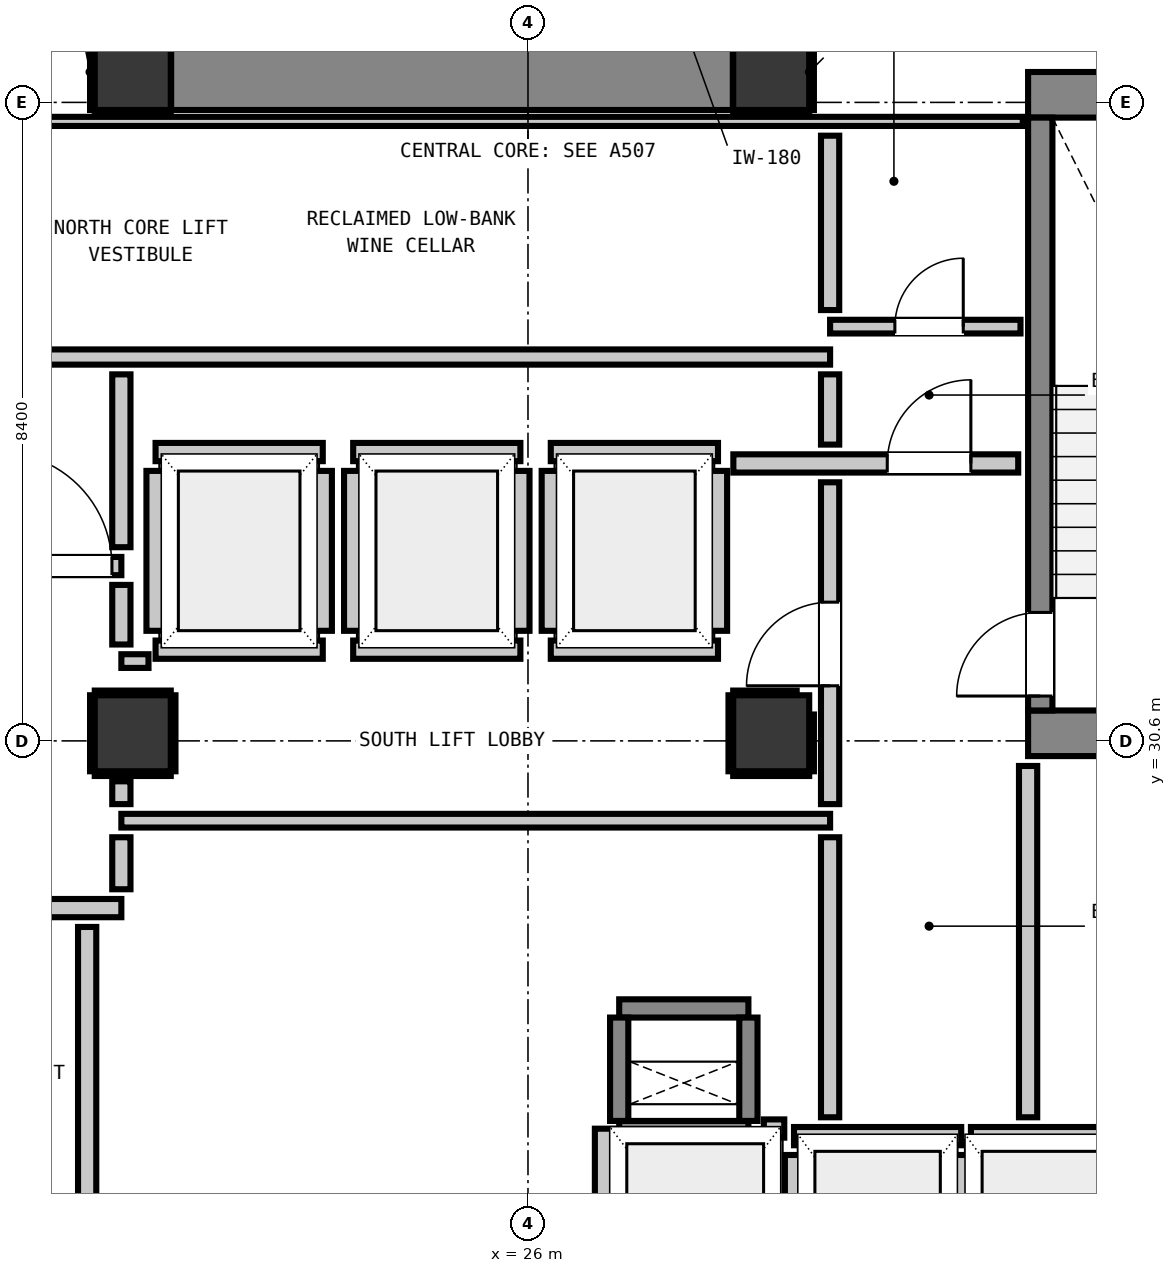
"""IFC4 building model, lengths in metres.
Left out: names, types, materials, properties, quantities, classifications, styles, units other than length and angle.
Written with IfcOpenShell. Run it as: python <this file> out.ifc"""

import sys

from ifc_helpers import new_model, si_unit, direction, frame, frame_2d, origin, origin_2d, place, context, subcontext, project, spatial, rectangle, extrude, element, fill, save


model = new_model("IFC4")
c1 = context("Model", 3, precision=1e-05, world=origin(), true_north=direction((0.0, 1.0)))
c2 = subcontext(c1, "Body", "Model", "MODEL_VIEW")
j1 = project(units=[si_unit("LENGTHUNIT", "METRE"), si_unit("PLANEANGLEUNIT", "RADIAN")], contexts=[c1])
p1 = place(None, origin())
s1 = spatial("IfcSite", under=j1, at=p1, CompositionType="ELEMENT")
p2 = place(p1, origin())
s2 = spatial("IfcBuilding", under=s1, at=p2, CompositionType="ELEMENT")
p3 = place(p2, frame((0.0, 0.0, 135.96)))
s3 = spatial("IfcBuildingStorey", under=s2, at=p3, CompositionType="ELEMENT", Elevation=135.96)
for number, where, z_axis, x_axis in (
    (1, (20.8, 39.4, 0.0), (0.0, 0.0, 1.0), (1.0, 0.0, 0.0)),
    (2, (29.2, 39.4, 0.0), (0.0, 0.0, 1.0), (1.0, 0.0, 0.0)),
):
    element("IfcColumn", number, at=place(p3, frame(where, z_axis=z_axis, x_axis=x_axis)), inside=s3, PredefinedType="COLUMN", context=c2, shape_type="SweptSolid", body=[
        extrude(rectangle(XDim=1.0, YDim=1.0, at=origin_2d()), origin(), (0.0, 0.0, 1.0), 3.32),
    ])
p4 = place(p3, frame((32.58, 39.1, 0.0), z_axis=(0.0, 0.0, 1.0), x_axis=(1.0, 0.0, 0.0)))
e3 = element("IfcWall", 3, at=p4, inside=s3, PredefinedType="SHEAR", context=c2, shape_type="SweptSolid", body=[
    extrude(rectangle(XDim=4.08, YDim=0.6, at=frame_2d((2.04, 0.0))), origin(), (0.0, 0.0, 1.0), 3.32),
])
p5 = place(p3, frame((32.58, 30.7, 0.0), z_axis=(0.0, 0.0, 1.0), x_axis=(1.0, 0.0, 0.0)))
e4 = element("IfcWall", 4, at=p5, inside=s3, PredefinedType="SHEAR", context=c2, shape_type="SweptSolid", body=[
    extrude(rectangle(XDim=3.415, YDim=0.6, at=frame_2d((1.708, 0.0))), origin(), (0.0, 0.0, 1.0), 3.32),
])
p6 = place(p3, frame((21.305, 39.4, 0.0), z_axis=(0.0, 0.0, 1.0), x_axis=(1.0, 0.0, 0.0)))
e5 = element("IfcWall", 5, at=p6, inside=s3, PredefinedType="SHEAR", context=c2, shape_type="SweptSolid", body=[
    extrude(rectangle(XDim=7.39, YDim=1.0, at=frame_2d((3.695, 0.0))), origin(), (0.0, 0.0, 1.0), 3.32),
])
p7 = place(p3, frame((32.74, 31.0, 0.0), z_axis=(0.0, 0.0, 1.0), x_axis=(0.0, 1.0, 0.0)))
e6 = element("IfcWall", 6, at=p7, inside=s3, PredefinedType="SHEAR", context=c2, shape_type="SweptSolid", body=[
    extrude(rectangle(XDim=7.8, YDim=0.32, at=frame_2d((3.9, 0.0))), origin(), (0.0, 0.0, 1.0), 3.32),
])
p8 = place(p7, frame((0.19, 0.0, 0.0)))
e7 = element("IfcOpeningElement", 7, at=p8, cuts=e6, PredefinedType="OPENING", context=c2, shape_type="SweptSolid", body=[
    extrude(rectangle(XDim=1.1, YDim=2.15, at=frame_2d((0.55, 1.075))), frame((0.0, 0.17, 0.0), z_axis=(0.0, -1.0, 0.0), x_axis=(1.0, 0.0, 0.0)), (0.0, 0.0, 1.0), 0.34),
])
for number, where, z_axis, x_axis in (
    (8, (27.2, 25.48, 0.0), (0.0, 0.0, 1.0), (1.0, 0.0, 0.0)),
    (9, (27.2, 27.08, 0.0), (0.0, 0.0, 1.0), (1.0, 0.0, 0.0)),
):
    element("IfcWall", number, at=place(p3, frame(where, z_axis=z_axis, x_axis=x_axis)), inside=s3, PredefinedType="SHEAR", context=c2, shape_type="SweptSolid", body=[
        extrude(rectangle(XDim=1.7, YDim=0.24, at=frame_2d((0.85, 0.0))), origin(), (0.0, 0.0, 1.0), 3.32),
    ])
for number, where, z_axis, x_axis in (
    (10, (27.2, 25.6, 0.0), (0.0, 0.0, 1.0), (0.0, 1.0, 0.0)),
    (11, (28.9, 25.6, 0.0), (0.0, 0.0, 1.0), (0.0, 1.0, 0.0)),
):
    element("IfcWall", number, at=place(p3, frame(where, z_axis=z_axis, x_axis=x_axis)), inside=s3, PredefinedType="SHEAR", context=c2, shape_type="SweptSolid", body=[
        extrude(rectangle(XDim=1.36, YDim=0.24, at=frame_2d((0.68, 0.0))), origin(), (0.0, 0.0, 1.0), 3.32),
    ])
for number, where, z_axis, x_axis in (
    (12, (20.8, 30.7, 0.0), (0.0, 0.0, 1.0), (1.0, 0.0, 0.0)),
    (13, (29.2, 30.7, 0.0), (0.0, 0.0, 1.0), (1.0, 0.0, 0.0)),
):
    element("IfcColumn", number, at=place(p3, frame(where, z_axis=z_axis, x_axis=x_axis)), inside=s3, PredefinedType="COLUMN", context=c2, shape_type="SweptSolid", body=[
        extrude(rectangle(XDim=1.0, YDim=1.0, at=origin_2d()), origin(), (0.0, 0.0, 1.0), 3.32),
    ])
for number, where, z_axis, x_axis in (
    (14, (21.1, 31.8, 0.0), (0.0, 0.0, 1.0), (1.0, 0.0, 0.0)),
    (15, (21.1, 34.4, 0.0), (0.0, 0.0, 1.0), (1.0, 0.0, 0.0)),
):
    element("IfcWall", number, at=place(p3, frame(where, z_axis=z_axis, x_axis=x_axis)), inside=s3, PredefinedType="PARTITIONING", context=c2, shape_type="SweptSolid", body=[
        extrude(rectangle(XDim=2.2, YDim=0.24, at=frame_2d((1.1, 0.0))), origin(), (0.0, 0.0, 1.0), 3.08),
    ])
p9 = place(p3, frame((21.1, 32.048, 0.0), z_axis=(0.0, 0.0, 1.0), x_axis=(0.0, 1.0, 0.0)))
e16 = element("IfcWall", 16, at=p9, inside=s3, PredefinedType="PARTITIONING", context=c2, shape_type="SweptSolid", body=[
    extrude(rectangle(XDim=2.104, YDim=0.24, at=frame_2d((1.052, 0.0))), origin(), (0.0, 0.0, 1.0), 2.315),
])
p10 = place(p3, frame((23.3, 32.048, 0.0), z_axis=(0.0, 0.0, 1.0), x_axis=(0.0, 1.0, 0.0)))
e17 = element("IfcWall", 17, at=p10, inside=s3, PredefinedType="PARTITIONING", context=c2, shape_type="SweptSolid", body=[
    extrude(rectangle(XDim=2.104, YDim=0.24, at=frame_2d((1.052, 0.0))), origin(), (0.0, 0.0, 1.0), 3.08),
])
for number, where, z_axis, x_axis in (
    (18, (23.7, 31.8, 0.0), (0.0, 0.0, 1.0), (1.0, 0.0, 0.0)),
    (19, (23.7, 34.4, 0.0), (0.0, 0.0, 1.0), (1.0, 0.0, 0.0)),
):
    element("IfcWall", number, at=place(p3, frame(where, z_axis=z_axis, x_axis=x_axis)), inside=s3, PredefinedType="PARTITIONING", context=c2, shape_type="SweptSolid", body=[
        extrude(rectangle(XDim=2.2, YDim=0.24, at=frame_2d((1.1, 0.0))), origin(), (0.0, 0.0, 1.0), 3.08),
    ])
for number, where, z_axis, x_axis in (
    (20, (23.7, 32.048, 0.0), (0.0, 0.0, 1.0), (0.0, 1.0, 0.0)),
    (21, (25.9, 32.048, 0.0), (0.0, 0.0, 1.0), (0.0, 1.0, 0.0)),
):
    element("IfcWall", number, at=place(p3, frame(where, z_axis=z_axis, x_axis=x_axis)), inside=s3, PredefinedType="PARTITIONING", context=c2, shape_type="SweptSolid", body=[
        extrude(rectangle(XDim=2.104, YDim=0.24, at=frame_2d((1.052, 0.0))), origin(), (0.0, 0.0, 1.0), 3.08),
    ])
for number, where, z_axis, x_axis in (
    (22, (26.3, 31.8, 0.0), (0.0, 0.0, 1.0), (1.0, 0.0, 0.0)),
    (23, (26.3, 34.4, 0.0), (0.0, 0.0, 1.0), (1.0, 0.0, 0.0)),
):
    element("IfcWall", number, at=place(p3, frame(where, z_axis=z_axis, x_axis=x_axis)), inside=s3, PredefinedType="PARTITIONING", context=c2, shape_type="SweptSolid", body=[
        extrude(rectangle(XDim=2.2, YDim=0.24, at=frame_2d((1.1, 0.0))), origin(), (0.0, 0.0, 1.0), 3.08),
    ])
for number, where, z_axis, x_axis in (
    (24, (26.3, 32.048, 0.0), (0.0, 0.0, 1.0), (0.0, 1.0, 0.0)),
    (25, (28.5, 32.048, 0.0), (0.0, 0.0, 1.0), (0.0, 1.0, 0.0)),
):
    element("IfcWall", number, at=place(p3, frame(where, z_axis=z_axis, x_axis=x_axis)), inside=s3, PredefinedType="PARTITIONING", context=c2, shape_type="SweptSolid", body=[
        extrude(rectangle(XDim=2.104, YDim=0.24, at=frame_2d((1.052, 0.0))), origin(), (0.0, 0.0, 1.0), 3.08),
    ])
p11 = place(p3, frame((29.5, 25.4, 0.0), z_axis=(0.0, 0.0, 1.0), x_axis=(1.0, 0.0, 0.0)))
e26 = element("IfcWall", 26, at=p11, inside=s3, PredefinedType="PARTITIONING", context=c2, shape_type="SweptSolid", body=[
    extrude(rectangle(XDim=2.2, YDim=0.24, at=frame_2d((1.1, 0.0))), origin(), (0.0, 0.0, 1.0), 3.08),
])
p12 = place(p3, frame((29.5, 22.632, 0.0), z_axis=(0.0, 0.0, 1.0), x_axis=(0.0, 1.0, 0.0)))
e27 = element("IfcWall", 27, at=p12, inside=s3, PredefinedType="PARTITIONING", context=c2, shape_type="SweptSolid", body=[
    extrude(rectangle(XDim=2.52, YDim=0.24, at=frame_2d((1.26, 0.0))), origin(), (0.0, 0.0, 1.0), 2.315),
])
p13 = place(p3, frame((31.7, 22.63, 0.0), z_axis=(0.0, 0.0, 1.0), x_axis=(0.0, 1.0, 0.0)))
e28 = element("IfcWall", 28, at=p13, inside=s3, PredefinedType="PARTITIONING", context=c2, shape_type="SweptSolid", body=[
    extrude(rectangle(XDim=2.522, YDim=0.24, at=frame_2d((1.261, 0.0))), origin(), (0.0, 0.0, 1.0), 3.08),
])
p14 = place(p3, frame((31.828, 25.4, 0.0), z_axis=(0.0, 0.0, 1.0), x_axis=(1.0, 0.0, 0.0)))
e29 = element("IfcWall", 29, at=p14, inside=s3, PredefinedType="PARTITIONING", context=c2, shape_type="SweptSolid", body=[
    extrude(rectangle(XDim=2.072, YDim=0.24, at=frame_2d((1.036, 0.0))), origin(), (0.0, 0.0, 1.0), 3.08),
])
p15 = place(p3, frame((29.103, 25.5, 0.0), z_axis=(0.0, 0.0, 1.0), x_axis=(1.0, 0.0, 0.0)))
e30 = element("IfcWall", 30, at=p15, inside=s3, PredefinedType="PARTITIONING", context=c2, shape_type="SweptSolid", body=[
    extrude(rectangle(XDim=0.269, YDim=0.24, at=frame_2d((0.135, 0.0))), origin(), (0.0, 0.0, 1.0), 3.08),
])
p16 = place(p3, frame((27.0, 22.63, 0.0), z_axis=(0.0, 0.0, 1.0), x_axis=(0.0, 1.0, 0.0)))
e31 = element("IfcWall", 31, at=p16, inside=s3, PredefinedType="PARTITIONING", context=c2, shape_type="SweptSolid", body=[
    extrude(rectangle(XDim=2.868, YDim=0.24, at=frame_2d((1.434, 0.0))), origin(), (0.0, 0.0, 1.0), 3.08),
])
p17 = place(p3, frame((17.45, 28.4, 0.0), z_axis=(0.0, 0.0, 1.0), x_axis=(1.0, 0.0, 0.0)))
e32 = element("IfcWall", 32, at=p17, inside=s3, PredefinedType="PARTITIONING", context=c2, shape_type="SweptSolid", body=[
    extrude(rectangle(XDim=3.2, YDim=0.24, at=frame_2d((1.6, 0.0))), origin(), (0.0, 0.0, 1.0), 3.08),
])
p18 = place(p17, frame((0.784, 0.0, 0.0)))
e33 = element("IfcOpeningElement", 33, at=p18, cuts=e32, PredefinedType="OPENING", context=c2, shape_type="SweptSolid", body=[
    extrude(rectangle(XDim=1.1, YDim=2.15, at=frame_2d((0.55, 1.075))), frame((0.0, 0.13, 0.0), z_axis=(0.0, -1.0, 0.0), x_axis=(1.0, 0.0, 0.0)), (0.0, 0.0, 1.0), 0.26),
])
p19 = place(p3, frame((17.45, 32.9, 0.0), z_axis=(0.0, 0.0, 1.0), x_axis=(1.0, 0.0, 0.0)))
e34 = element("IfcWall", 34, at=p19, inside=s3, PredefinedType="PARTITIONING", context=c2, shape_type="SweptSolid", body=[
    extrude(rectangle(XDim=3.2, YDim=0.24, at=frame_2d((1.6, 0.0))), origin(), (0.0, 0.0, 1.0), 3.08),
])
p20 = place(p19, frame((0.159, 0.0, 0.0)))
e35 = element("IfcOpeningElement", 35, at=p20, cuts=e34, PredefinedType="OPENING", context=c2, shape_type="SweptSolid", body=[
    extrude(rectangle(XDim=1.1, YDim=2.15, at=frame_2d((0.55, 1.075))), frame((0.0, 0.13, 0.0), z_axis=(0.0, -1.0, 0.0), x_axis=(1.0, 0.0, 0.0)), (0.0, 0.0, 1.0), 0.26),
])
p21 = place(p19, frame((1.576, 0.0, 0.0)))
e36 = element("IfcOpeningElement", 36, at=p21, cuts=e34, PredefinedType="OPENING", context=c2, shape_type="SweptSolid", body=[
    extrude(rectangle(XDim=1.5, YDim=2.15, at=frame_2d((0.75, 1.075))), frame((0.0, 0.13, 0.0), z_axis=(0.0, -1.0, 0.0), x_axis=(1.0, 0.0, 0.0)), (0.0, 0.0, 1.0), 0.26),
])
p22 = place(p3, frame((28.702, 34.25, 0.0), z_axis=(0.0, 0.0, 1.0), x_axis=(1.0, 0.0, 0.0)))
e37 = element("IfcWall", 37, at=p22, inside=s3, PredefinedType="PARTITIONING", context=c2, shape_type="SweptSolid", body=[
    extrude(rectangle(XDim=3.748, YDim=0.24, at=frame_2d((1.874, 0.0))), origin(), (0.0, 0.0, 1.0), 3.08),
])
p23 = place(p22, frame((2.025, 0.0, 0.0)))
e38 = element("IfcOpeningElement", 38, at=p23, cuts=e37, PredefinedType="OPENING", context=c2, shape_type="SweptSolid", body=[
    extrude(rectangle(XDim=1.1, YDim=2.15, at=frame_2d((0.55, 1.075))), frame((0.0, 0.13, 0.0), z_axis=(0.0, -1.0, 0.0), x_axis=(1.0, 0.0, 0.0)), (0.0, 0.0, 1.0), 0.26),
])
p24 = place(p3, frame((18.95, 35.65, 0.0), z_axis=(0.0, 0.0, 1.0), x_axis=(1.0, 0.0, 0.0)))
e39 = element("IfcWall", 39, at=p24, inside=s3, PredefinedType="PARTITIONING", context=c2, shape_type="SweptSolid", body=[
    extrude(rectangle(XDim=11.025, YDim=0.2, at=frame_2d((5.513, 0.0))), origin(), (0.0, 0.0, 1.0), 3.08),
])
p25 = place(p3, frame((20.65, 29.55, 0.0), z_axis=(0.0, 0.0, 1.0), x_axis=(1.0, 0.0, 0.0)))
e40 = element("IfcWall", 40, at=p25, inside=s3, PredefinedType="PARTITIONING", context=c2, shape_type="SweptSolid", body=[
    extrude(rectangle(XDim=9.325, YDim=0.18, at=frame_2d((4.663, 0.0))), origin(), (0.0, 0.0, 1.0), 3.08),
])
p26 = place(p3, frame((20.65, 31.65, 0.0), z_axis=(0.0, 0.0, 1.0), x_axis=(1.0, 0.0, 0.0)))
e41 = element("IfcWall", 41, at=p26, inside=s3, PredefinedType="PARTITIONING", context=c2, shape_type="SweptSolid", body=[
    extrude(rectangle(XDim=0.357, YDim=0.18, at=frame_2d((0.179, 0.0))), origin(), (0.0, 0.0, 1.0), 3.08),
])
p27 = place(p3, frame((29.975, 36.05, 0.0), z_axis=(0.0, 0.0, 1.0), x_axis=(1.0, 0.0, 0.0)))
e42 = element("IfcWall", 42, at=p27, inside=s3, PredefinedType="PARTITIONING", context=c2, shape_type="SweptSolid", body=[
    extrude(rectangle(XDim=2.505, YDim=0.18, at=frame_2d((1.252, 0.0))), origin(), (0.0, 0.0, 1.0), 3.08),
])
p28 = place(p27, frame((0.852, 0.0, 0.0)))
e43 = element("IfcOpeningElement", 43, at=p28, cuts=e42, PredefinedType="OPENING", context=c2, shape_type="SweptSolid", body=[
    extrude(rectangle(XDim=0.9, YDim=2.1, at=frame_2d((0.45, 1.05))), frame((0.0, 0.1, 0.0), z_axis=(0.0, -1.0, 0.0), x_axis=(1.0, 0.0, 0.0)), (0.0, 0.0, 1.0), 0.2),
])
p29 = place(p3, frame((18.95, 38.75, 0.0), z_axis=(0.0, 0.0, 1.0), x_axis=(1.0, 0.0, 0.0)))
e44 = element("IfcWall", 44, at=p29, inside=s3, PredefinedType="PARTITIONING", context=c2, shape_type="SweptSolid", body=[
    extrude(rectangle(XDim=13.56, YDim=0.12, at=frame_2d((6.78, 0.0))), origin(), (0.0, 0.0, 1.0), 3.08),
])
p30 = place(p3, frame((20.2, 22.586, 0.0), z_axis=(0.0, 0.0, 1.0), x_axis=(0.0, 1.0, 0.0)))
e45 = element("IfcWall", 45, at=p30, inside=s3, PredefinedType="PARTITIONING", context=c2, shape_type="SweptSolid", body=[
    extrude(rectangle(XDim=5.566, YDim=0.24, at=frame_2d((2.783, 0.0))), origin(), (0.0, 0.0, 1.0), 3.08),
])
p31 = place(p3, frame((20.65, 28.648, 0.0), z_axis=(0.0, 0.0, 1.0), x_axis=(0.0, 1.0, 0.0)))
e46 = element("IfcWall", 46, at=p31, inside=s3, PredefinedType="PARTITIONING", context=c2, shape_type="SweptSolid", body=[
    extrude(rectangle(XDim=0.684, YDim=0.24, at=frame_2d((0.342, 0.0))), origin(), (0.0, 0.0, 1.0), 2.315),
])
p32 = place(p3, frame((20.65, 29.768, 0.0), z_axis=(0.0, 0.0, 1.0), x_axis=(0.0, 1.0, 0.0)))
e47 = element("IfcWall", 47, at=p32, inside=s3, PredefinedType="PARTITIONING", context=c2, shape_type="SweptSolid", body=[
    extrude(rectangle(XDim=0.3, YDim=0.24, at=frame_2d((0.15, 0.0))), origin(), (0.0, 0.0, 1.0), 2.315),
])
p33 = place(p3, frame((20.65, 31.868, 0.0), z_axis=(0.0, 0.0, 1.0), x_axis=(0.0, 1.0, 0.0)))
e48 = element("IfcWall", 48, at=p33, inside=s3, PredefinedType="PARTITIONING", context=c2, shape_type="SweptSolid", body=[
    extrude(rectangle(XDim=0.784, YDim=0.24, at=frame_2d((0.392, 0.0))), origin(), (0.0, 0.0, 1.0), 2.315),
])
p34 = place(p3, frame((20.65, 33.148, 0.0), z_axis=(0.0, 0.0, 1.0), x_axis=(0.0, 1.0, 0.0)))
e49 = element("IfcWall", 49, at=p34, inside=s3, PredefinedType="PARTITIONING", context=c2, shape_type="SweptSolid", body=[
    extrude(rectangle(XDim=2.274, YDim=0.24, at=frame_2d((1.137, 0.0))), origin(), (0.0, 0.0, 1.0), 2.315),
])
p35 = place(p3, frame((29.975, 25.648, 0.0), z_axis=(0.0, 0.0, 1.0), x_axis=(0.0, 1.0, 0.0)))
e50 = element("IfcWall", 50, at=p35, inside=s3, PredefinedType="PARTITIONING", context=c2, shape_type="SweptSolid", body=[
    extrude(rectangle(XDim=3.684, YDim=0.24, at=frame_2d((1.842, 0.0))), origin(), (0.0, 0.0, 1.0), 3.08),
])
p36 = place(p3, frame((29.975, 29.768, 0.0), z_axis=(0.0, 0.0, 1.0), x_axis=(0.0, 1.0, 0.0)))
e51 = element("IfcWall", 51, at=p36, inside=s3, PredefinedType="PARTITIONING", context=c2, shape_type="SweptSolid", body=[
    extrude(rectangle(XDim=4.234, YDim=0.24, at=frame_2d((2.117, 0.0))), origin(), (0.0, 0.0, 1.0), 3.08),
])
p37 = place(p36, frame((1.557, 0.0, 0.0)))
e52 = element("IfcOpeningElement", 52, at=p37, cuts=e51, PredefinedType="OPENING", context=c2, shape_type="SweptSolid", body=[
    extrude(rectangle(XDim=1.1, YDim=2.15, at=frame_2d((0.55, 1.075))), frame((0.0, 0.13, 0.0), z_axis=(0.0, -1.0, 0.0), x_axis=(1.0, 0.0, 0.0)), (0.0, 0.0, 1.0), 0.26),
])
p38 = place(p3, frame((29.975, 34.498, 0.0), z_axis=(0.0, 0.0, 1.0), x_axis=(0.0, 1.0, 0.0)))
e53 = element("IfcWall", 53, at=p38, inside=s3, PredefinedType="PARTITIONING", context=c2, shape_type="SweptSolid", body=[
    extrude(rectangle(XDim=0.924, YDim=0.24, at=frame_2d((0.462, 0.0))), origin(), (0.0, 0.0, 1.0), 3.08),
])
p39 = place(p3, frame((29.975, 36.268, 0.0), z_axis=(0.0, 0.0, 1.0), x_axis=(0.0, 1.0, 0.0)))
e54 = element("IfcWall", 54, at=p39, inside=s3, PredefinedType="PARTITIONING", context=c2, shape_type="SweptSolid", body=[
    extrude(rectangle(XDim=2.294, YDim=0.24, at=frame_2d((1.147, 0.0))), origin(), (0.0, 0.0, 1.0), 3.08),
])
p40 = place(p3, frame((32.58, 25.648, 0.0), z_axis=(0.0, 0.0, 1.0), x_axis=(0.0, 1.0, 0.0)))
e55 = element("IfcWall", 55, at=p40, inside=s3, PredefinedType="PARTITIONING", context=c2, shape_type="SweptSolid", body=[
    extrude(rectangle(XDim=4.622, YDim=0.24, at=frame_2d((2.311, 0.0))), origin(), (0.0, 0.0, 1.0), 3.08),
])
for number, where, z_axis, x_axis in (
    (56, (20.3, 38.868, 0.0), (0.0, 0.0, 1.0), (1.0, 0.0, 0.0)),
    (57, (20.268, 38.9, 0.0), (0.0, 0.0, 1.0), (0.0, 1.0, 0.0)),
    (58, (28.7, 38.868, 0.0), (0.0, 0.0, 1.0), (1.0, 0.0, 0.0)),
    (59, (29.732, 38.9, 0.0), (0.0, 0.0, 1.0), (0.0, 1.0, 0.0)),
    (60, (20.3, 30.168, 0.0), (0.0, 0.0, 1.0), (1.0, 0.0, 0.0)),
    (61, (20.3, 31.232, 0.0), (0.0, 0.0, 1.0), (1.0, 0.0, 0.0)),
    (62, (20.268, 30.2, 0.0), (0.0, 0.0, 1.0), (0.0, 1.0, 0.0)),
    (63, (21.332, 30.2, 0.0), (0.0, 0.0, 1.0), (0.0, 1.0, 0.0)),
    (64, (28.7, 30.168, 0.0), (0.0, 0.0, 1.0), (1.0, 0.0, 0.0)),
):
    element("IfcWall", number, at=place(p3, frame(where, z_axis=z_axis, x_axis=x_axis)), inside=s3, PredefinedType="PARTITIONING", context=c2, shape_type="SweptSolid", body=[
        extrude(rectangle(XDim=1.0, YDim=0.06, at=frame_2d((0.5, 0.0))), origin(), (0.0, 0.0, 1.0), 1.45),
    ])
p41 = place(p3, frame((28.7, 31.232, 0.0), z_axis=(0.0, 0.0, 1.0), x_axis=(1.0, 0.0, 0.0)))
e65 = element("IfcWall", 65, at=p41, inside=s3, PredefinedType="PARTITIONING", context=c2, shape_type="SweptSolid", body=[
    extrude(rectangle(XDim=0.835, YDim=0.06, at=frame_2d((0.417, 0.0))), origin(), (0.0, 0.0, 1.0), 1.45),
])
p42 = place(p3, frame((28.668, 30.2, 0.0), z_axis=(0.0, 0.0, 1.0), x_axis=(0.0, 1.0, 0.0)))
e66 = element("IfcWall", 66, at=p42, inside=s3, PredefinedType="PARTITIONING", context=c2, shape_type="SweptSolid", body=[
    extrude(rectangle(XDim=1.0, YDim=0.06, at=frame_2d((0.5, 0.0))), origin(), (0.0, 0.0, 1.0), 1.45),
])
p43 = place(p3, frame((29.732, 30.2, 0.0), z_axis=(0.0, 0.0, 1.0), x_axis=(0.0, 1.0, 0.0)))
e67 = element("IfcWall", 67, at=p43, inside=s3, PredefinedType="PARTITIONING", context=c2, shape_type="SweptSolid", body=[
    extrude(rectangle(XDim=0.747, YDim=0.06, at=frame_2d((0.374, 0.0))), origin(), (0.0, 0.0, 1.0), 1.45),
])
p44 = place(p8, origin())
e68 = element("IfcDoor", 68, at=p44, inside=s3, OperationType="SINGLE_SWING_LEFT", PredefinedType="DOOR", context=c2, shape_type="SweptSolid", body=[
    extrude(rectangle(XDim=1.1, YDim=2.15, at=frame_2d((0.55, 1.075))), frame((0.0, 0.025, 0.0), z_axis=(0.0, -1.0, 0.0), x_axis=(1.0, 0.0, 0.0)), (0.0, 0.0, 1.0), 0.05),
])
fill(e7, e68)
p45 = place(p37, origin())
e69 = element("IfcDoor", 69, at=p45, inside=s3, OperationType="SINGLE_SWING_LEFT", PredefinedType="DOOR", context=c2, shape_type="SweptSolid", body=[
    extrude(rectangle(XDim=1.1, YDim=2.15, at=frame_2d((0.55, 1.075))), frame((0.0, 0.025, 0.0), z_axis=(0.0, -1.0, 0.0), x_axis=(1.0, 0.0, 0.0)), (0.0, 0.0, 1.0), 0.05),
])
fill(e52, e69)
p46 = place(p23, origin())
e70 = element("IfcDoor", 70, at=p46, inside=s3, OperationType="SINGLE_SWING_RIGHT", PredefinedType="DOOR", context=c2, shape_type="SweptSolid", body=[
    extrude(rectangle(XDim=1.1, YDim=2.15, at=frame_2d((0.55, 1.075))), frame((0.0, 0.025, 0.0), z_axis=(0.0, -1.0, 0.0), x_axis=(1.0, 0.0, 0.0)), (0.0, 0.0, 1.0), 0.05),
])
fill(e38, e70)
p47 = place(p21, origin())
e71 = element("IfcDoor", 71, at=p47, inside=s3, OperationType="SINGLE_SWING_LEFT", PredefinedType="DOOR", context=c2, shape_type="SweptSolid", body=[
    extrude(rectangle(XDim=1.5, YDim=2.15, at=frame_2d((0.75, 1.075))), frame((0.0, 0.025, 0.0), z_axis=(0.0, -1.0, 0.0), x_axis=(1.0, 0.0, 0.0)), (0.0, 0.0, 1.0), 0.05),
])
fill(e36, e71)
p48 = place(p28, origin())
e72 = element("IfcDoor", 72, at=p48, inside=s3, OperationType="SINGLE_SWING_RIGHT", PredefinedType="DOOR", context=c2, shape_type="SweptSolid", body=[
    extrude(rectangle(XDim=0.9, YDim=2.1, at=frame_2d((0.45, 1.05))), frame((0.0, 0.025, 0.0), z_axis=(0.0, -1.0, 0.0), x_axis=(1.0, 0.0, 0.0)), (0.0, 0.0, 1.0), 0.05),
])
fill(e43, e72)
save(model, sys.argv[1])
